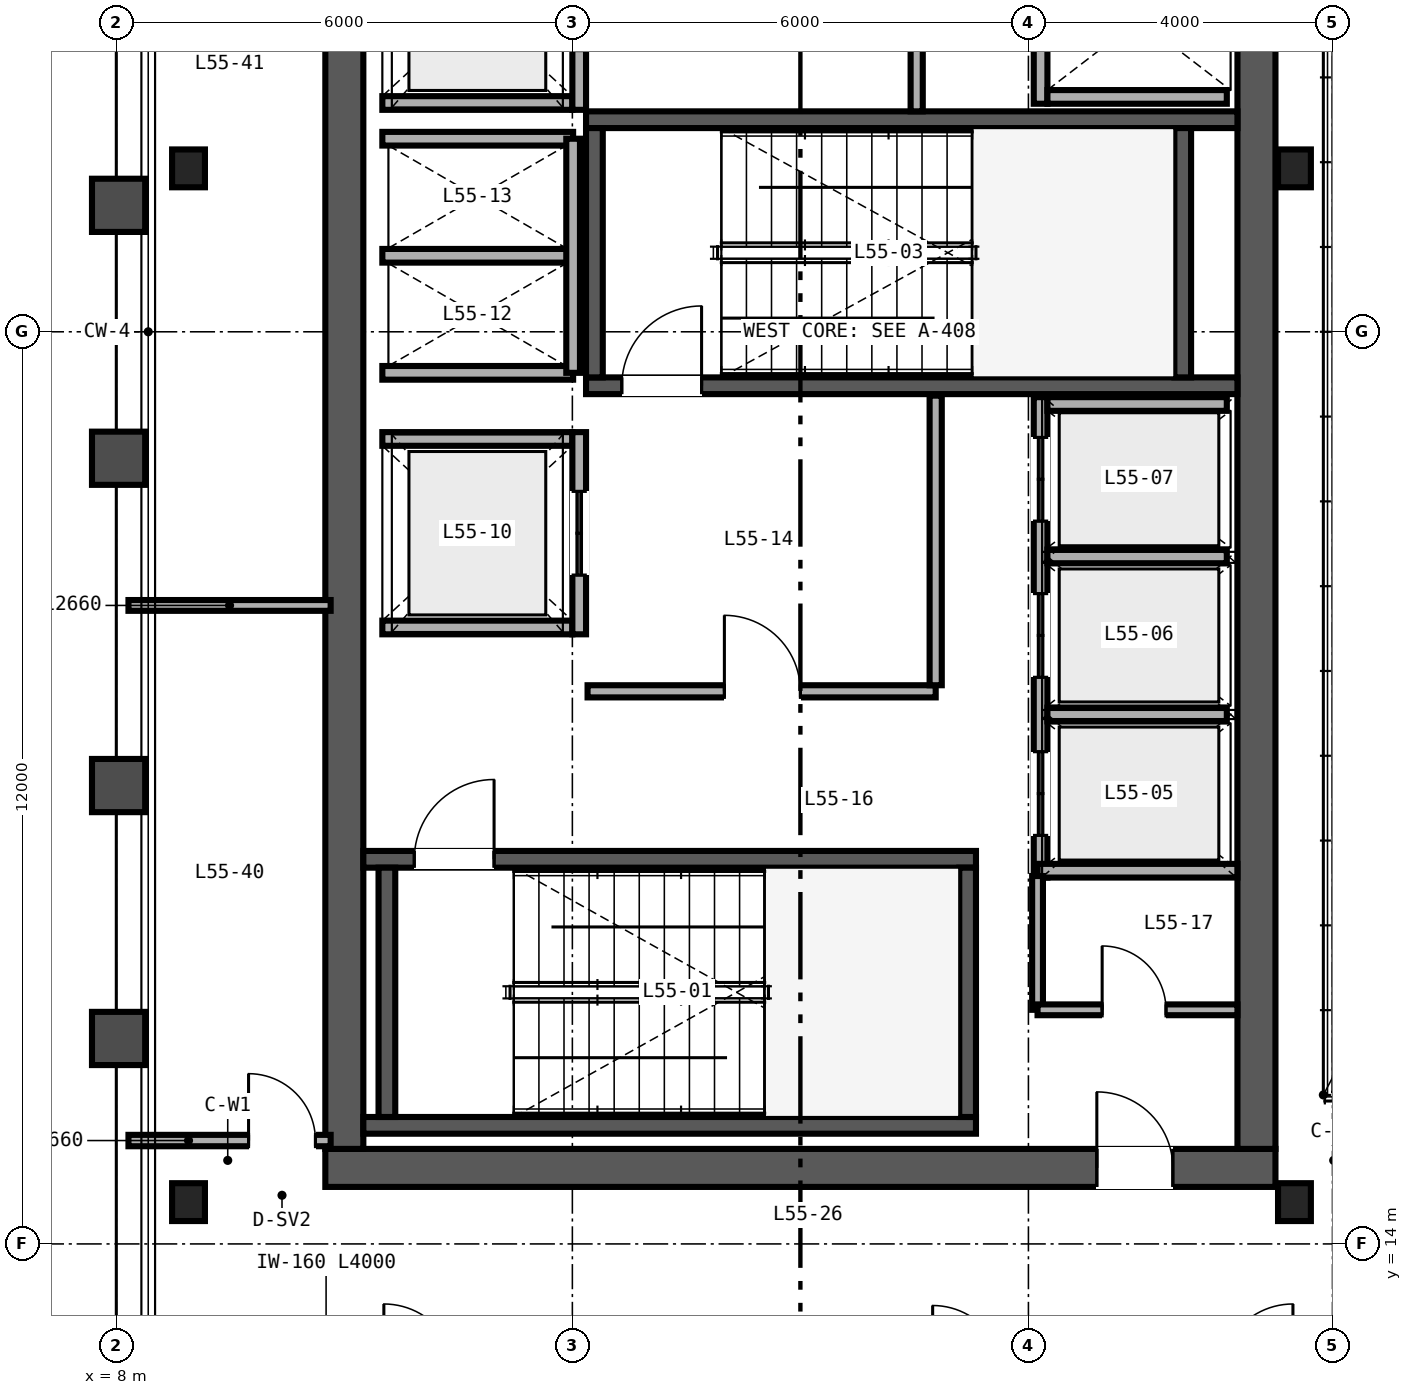
"""IFC4 building model, lengths in metres.
Left out: names, types, materials, properties, quantities, classifications, styles, units other than length and angle.
Written with IfcOpenShell. Run it as: python <this file> out.ifc"""

import sys

from ifc_helpers import new_model, si_unit, direction, frame, frame_2d, origin, origin_2d, place, context, subcontext, project, spatial, rectangle, i_section, extrude, source, transform, mapped, element, fill, save


model = new_model("IFC4")
c1 = context("Model", 3, precision=1e-05, world=origin(), true_north=direction((0.0, 1.0)))
c2 = subcontext(c1, "Body", "Model", "MODEL_VIEW")
j1 = project(units=[si_unit("LENGTHUNIT", "METRE"), si_unit("PLANEANGLEUNIT", "RADIAN")], contexts=[c1])
p1 = place(None, origin())
s1 = spatial("IfcSite", under=j1, at=p1, CompositionType="ELEMENT")
p2 = place(p1, origin())
s2 = spatial("IfcBuilding", under=s1, at=p2, CompositionType="ELEMENT")
p3 = place(p2, frame((0.0, 0.0, 217.2)))
s3 = spatial("IfcBuildingStorey", under=s2, at=p3, CompositionType="ELEMENT", Elevation=217.2)
p4 = place(p3, frame((10.75, 15.0, 0.0), z_axis=(0.0, 0.0, 1.0), x_axis=(1.0, 0.0, 0.0)))
e1 = element("IfcWall", 1, at=p4, inside=s3, PredefinedType="SHEAR", context=c2, shape_type="SweptSolid", body=[
    extrude(rectangle(XDim=12.5, YDim=0.5, at=frame_2d((6.25, 0.0))), origin(), (0.0, 0.0, 1.0), 3.28),
])
p5 = place(p4, frame((10.15, 0.0, 0.0)))
e2 = element("IfcOpeningElement", 2, at=p5, cuts=e1, PredefinedType="OPENING", context=c2, shape_type="SweptSolid", body=[
    extrude(rectangle(XDim=1.0, YDim=2.15, at=frame_2d((0.5, 1.075))), frame((0.0, 0.26, 0.0), z_axis=(0.0, -1.0, 0.0), x_axis=(1.0, 0.0, 0.0)), (0.0, 0.0, 1.0), 0.52),
])
for number, where, z_axis, x_axis in (
    (3, (11.0, 15.25, 0.0), (0.0, 0.0, 1.0), (0.0, 1.0, 0.0)),
    (4, (23.0, 15.25, 0.0), (0.0, 0.0, 1.0), (0.0, 1.0, 0.0)),
):
    element("IfcWall", number, at=place(p3, frame(where, z_axis=z_axis, x_axis=x_axis)), inside=s3, PredefinedType="SHEAR", context=c2, shape_type="SweptSolid", body=[
        extrude(rectangle(XDim=21.5, YDim=0.5, at=frame_2d((10.75, 0.0))), origin(), (0.0, 0.0, 1.0), 3.28),
    ])
p6 = place(p3, frame((11.25, 15.56, 0.0), z_axis=(0.0, 0.0, 1.0), x_axis=(1.0, 0.0, 0.0)))
e5 = element("IfcWall", 5, at=p6, inside=s3, PredefinedType="SHEAR", context=c2, shape_type="SweptSolid", body=[
    extrude(rectangle(XDim=8.06, YDim=0.22, at=frame_2d((4.03, 0.0))), origin(), (0.0, 0.0, 1.0), 3.4),
])
p7 = place(p3, frame((11.25, 19.06, 0.0), z_axis=(0.0, 0.0, 1.0), x_axis=(1.0, 0.0, 0.0)))
e6 = element("IfcWall", 6, at=p7, inside=s3, PredefinedType="SHEAR", context=c2, shape_type="SweptSolid", body=[
    extrude(rectangle(XDim=8.06, YDim=0.22, at=frame_2d((4.03, 0.0))), origin(), (0.0, 0.0, 1.0), 3.4),
])
p8 = place(p7, frame((0.67, 0.0, 0.0)))
e7 = element("IfcOpeningElement", 7, at=p8, cuts=e6, PredefinedType="OPENING", context=c2, shape_type="SweptSolid", body=[
    extrude(rectangle(XDim=1.05, YDim=2.15, at=frame_2d((0.525, 1.075))), frame((0.0, 0.12, 0.0), z_axis=(0.0, -1.0, 0.0), x_axis=(1.0, 0.0, 0.0)), (0.0, 0.0, 1.0), 0.24),
])
for number, where, z_axis, x_axis in (
    (8, (11.56, 15.67, 0.0), (0.0, 0.0, 1.0), (0.0, 1.0, 0.0)),
    (9, (19.2, 15.67, 0.0), (0.0, 0.0, 1.0), (0.0, 1.0, 0.0)),
):
    element("IfcWall", number, at=place(p3, frame(where, z_axis=z_axis, x_axis=x_axis)), inside=s3, PredefinedType="SHEAR", context=c2, shape_type="SweptSolid", body=[
        extrude(rectangle(XDim=3.28, YDim=0.22, at=frame_2d((1.64, 0.0))), origin(), (0.0, 0.0, 1.0), 3.4),
    ])
p9 = place(p3, frame((14.18, 25.29, 0.0), z_axis=(0.0, 0.0, 1.0), x_axis=(1.0, 0.0, 0.0)))
e10 = element("IfcWall", 10, at=p9, inside=s3, PredefinedType="SHEAR", context=c2, shape_type="SweptSolid", body=[
    extrude(rectangle(XDim=8.57, YDim=0.22, at=frame_2d((4.285, 0.0))), origin(), (0.0, 0.0, 1.0), 3.4),
])
p10 = place(p9, frame((0.47, 0.0, 0.0)))
e11 = element("IfcOpeningElement", 11, at=p10, cuts=e10, PredefinedType="OPENING", context=c2, shape_type="SweptSolid", body=[
    extrude(rectangle(XDim=1.05, YDim=2.15, at=frame_2d((0.525, 1.075))), frame((0.0, 0.12, 0.0), z_axis=(0.0, -1.0, 0.0), x_axis=(1.0, 0.0, 0.0)), (0.0, 0.0, 1.0), 0.24),
])
p11 = place(p3, frame((14.18, 28.79, 0.0), z_axis=(0.0, 0.0, 1.0), x_axis=(1.0, 0.0, 0.0)))
e12 = element("IfcWall", 12, at=p11, inside=s3, PredefinedType="SHEAR", context=c2, shape_type="SweptSolid", body=[
    extrude(rectangle(XDim=8.57, YDim=0.22, at=frame_2d((4.285, 0.0))), origin(), (0.0, 0.0, 1.0), 3.4),
])
for number, where, z_axis, x_axis in (
    (13, (14.29, 25.4, 0.0), (0.0, 0.0, 1.0), (0.0, 1.0, 0.0)),
    (14, (22.03, 25.4, 0.0), (0.0, 0.0, 1.0), (0.0, 1.0, 0.0)),
):
    element("IfcWall", number, at=place(p3, frame(where, z_axis=z_axis, x_axis=x_axis)), inside=s3, PredefinedType="SHEAR", context=c2, shape_type="SweptSolid", body=[
        extrude(rectangle(XDim=3.28, YDim=0.22, at=frame_2d((1.64, 0.0))), origin(), (0.0, 0.0, 1.0), 3.4),
    ])
m1 = source(origin(), c2, "Body", "SweptSolid", [
    extrude(i_section(OverallWidth=0.432, OverallDepth=0.498, WebThickness=0.056, FlangeThickness=0.089, FilletRadius=0.025, at=origin_2d()), origin(), (0.0, 0.0, 1.0), 3.28),
])
for number, where, z_axis, x_axis in (
    (15, (8.95, 14.55, 0.0), (0.0, 0.0, 1.0), (1.0, 0.0, 0.0)),
    (16, (23.5, 14.55, 0.0), (0.0, 0.0, 1.0), (1.0, 0.0, 0.0)),
    (17, (8.95, 28.15, 0.0), (0.0, 0.0, 1.0), (1.0, 0.0, 0.0)),
    (18, (23.5, 28.15, 0.0), (0.0, 0.0, 1.0), (1.0, 0.0, 0.0)),
):
    element("IfcColumn", number, at=place(p3, frame(where, z_axis=z_axis, x_axis=x_axis)), inside=s3, PredefinedType="COLUMN", context=c2, shape_type="MappedRepresentation", body=[
        mapped(m1, transform((0.0, 0.0, 0.0), scale=1.0)),
    ])
p12 = place(p3, frame((20.16, 18.82, 0.0), z_axis=(0.0, 0.0, 1.0), x_axis=(0.0, 1.0, 0.0)))
e19 = element("IfcWall", 19, at=p12, inside=s3, PredefinedType="SOLIDWALL", context=c2, shape_type="SweptSolid", body=[
    extrude(rectangle(XDim=6.32, YDim=0.18, at=frame_2d((3.16, 0.0))), origin(), (0.0, 0.0, 1.0), 2.38),
])
p13 = place(p12, frame((0.555, 0.0, 0.0)))
e20 = element("IfcOpeningElement", 20, at=p13, cuts=e19, PredefinedType="OPENING", context=c2, shape_type="SweptSolid", body=[
    extrude(rectangle(XDim=1.1, YDim=2.2, at=frame_2d((0.55, 1.1))), frame((0.0, 0.1, 0.0), z_axis=(0.0, -1.0, 0.0), x_axis=(1.0, 0.0, 0.0)), (0.0, 0.0, 1.0), 0.2),
])
p14 = place(p12, frame((2.635, 0.0, 0.0)))
e21 = element("IfcOpeningElement", 21, at=p14, cuts=e19, PredefinedType="OPENING", context=c2, shape_type="SweptSolid", body=[
    extrude(rectangle(XDim=1.1, YDim=2.2, at=frame_2d((0.55, 1.1))), frame((0.0, 0.1, 0.0), z_axis=(0.0, -1.0, 0.0), x_axis=(1.0, 0.0, 0.0)), (0.0, 0.0, 1.0), 0.2),
])
p15 = place(p12, frame((4.69, 0.0, 0.0)))
e22 = element("IfcOpeningElement", 22, at=p15, cuts=e19, PredefinedType="OPENING", context=c2, shape_type="SweptSolid", body=[
    extrude(rectangle(XDim=1.1, YDim=2.2, at=frame_2d((0.55, 1.1))), frame((0.0, 0.1, 0.0), z_axis=(0.0, -1.0, 0.0), x_axis=(1.0, 0.0, 0.0)), (0.0, 0.0, 1.0), 0.2),
])
p16 = place(p3, frame((20.12, 18.91, 0.0), z_axis=(0.0, 0.0, 1.0), x_axis=(1.0, 0.0, 0.0)))
e23 = element("IfcWall", 23, at=p16, inside=s3, PredefinedType="SOLIDWALL", context=c2, shape_type="SweptSolid", body=[
    extrude(rectangle(XDim=2.63, YDim=0.18, at=frame_2d((1.315, 0.0))), origin(), (0.0, 0.0, 1.0), 3.28),
])
p17 = place(p3, frame((20.25, 25.05, 0.0), z_axis=(0.0, 0.0, 1.0), x_axis=(1.0, 0.0, 0.0)))
e24 = element("IfcWall", 24, at=p17, inside=s3, PredefinedType="SOLIDWALL", context=c2, shape_type="SweptSolid", body=[
    extrude(rectangle(XDim=2.36, YDim=0.18, at=frame_2d((1.18, 0.0))), origin(), (0.0, 0.0, 1.0), 3.28),
])
p18 = place(p3, frame((20.25, 20.965, 0.0), z_axis=(0.0, 0.0, 1.0), x_axis=(1.0, 0.0, 0.0)))
e25 = element("IfcWall", 25, at=p18, inside=s3, PredefinedType="SOLIDWALL", context=c2, shape_type="SweptSolid", body=[
    extrude(rectangle(XDim=2.36, YDim=0.18, at=frame_2d((1.18, 0.0))), origin(), (0.0, 0.0, 1.0), 2.38),
])
p19 = place(p3, frame((20.25, 23.045, 0.0), z_axis=(0.0, 0.0, 1.0), x_axis=(1.0, 0.0, 0.0)))
e26 = element("IfcWall", 26, at=p19, inside=s3, PredefinedType="SOLIDWALL", context=c2, shape_type="SweptSolid", body=[
    extrude(rectangle(XDim=2.36, YDim=0.18, at=frame_2d((1.18, 0.0))), origin(), (0.0, 0.0, 1.0), 3.28),
])
p20 = place(p3, frame((20.16, 29.0, 0.0), z_axis=(0.0, 0.0, 1.0), x_axis=(0.0, 1.0, 0.0)))
e27 = element("IfcWall", 27, at=p20, inside=s3, PredefinedType="SOLIDWALL", context=c2, shape_type="SweptSolid", body=[
    extrude(rectangle(XDim=4.29, YDim=0.18, at=frame_2d((2.145, 0.0))), origin(), (0.0, 0.0, 1.0), 3.28),
])
p21 = place(p3, frame((20.25, 29.09, 0.0), z_axis=(0.0, 0.0, 1.0), x_axis=(1.0, 0.0, 0.0)))
e28 = element("IfcWall", 28, at=p21, inside=s3, PredefinedType="SOLIDWALL", context=c2, shape_type="SweptSolid", body=[
    extrude(rectangle(XDim=2.36, YDim=0.18, at=frame_2d((1.18, 0.0))), origin(), (0.0, 0.0, 1.0), 3.28),
])
for number, where, z_axis, x_axis in (
    (29, (11.5, 22.11, 0.0), (0.0, 0.0, 1.0), (1.0, 0.0, 0.0)),
    (30, (11.5, 24.59, 0.0), (0.0, 0.0, 1.0), (1.0, 0.0, 0.0)),
):
    element("IfcWall", number, at=place(p3, frame(where, z_axis=z_axis, x_axis=x_axis)), inside=s3, PredefinedType="SOLIDWALL", context=c2, shape_type="SweptSolid", body=[
        extrude(rectangle(XDim=2.5, YDim=0.18, at=frame_2d((1.25, 0.0))), origin(), (0.0, 0.0, 1.0), 3.28),
    ])
p22 = place(p3, frame((14.09, 22.02, 0.0), z_axis=(0.0, 0.0, 1.0), x_axis=(0.0, 1.0, 0.0)))
e31 = element("IfcWall", 31, at=p22, inside=s3, PredefinedType="SOLIDWALL", context=c2, shape_type="SweptSolid", body=[
    extrude(rectangle(XDim=2.66, YDim=0.18, at=frame_2d((1.33, 0.0))), origin(), (0.0, 0.0, 1.0), 3.28),
])
p23 = place(p22, frame((0.78, 0.0, 0.0)))
e32 = element("IfcOpeningElement", 32, at=p23, cuts=e31, PredefinedType="OPENING", context=c2, shape_type="SweptSolid", body=[
    extrude(rectangle(XDim=1.1, YDim=2.2, at=frame_2d((0.55, 1.1))), frame((0.0, 0.1, 0.0), z_axis=(0.0, -1.0, 0.0), x_axis=(1.0, 0.0, 0.0)), (0.0, 0.0, 1.0), 0.2),
])
p24 = place(p3, frame((11.5, 29.01, 0.0), z_axis=(0.0, 0.0, 1.0), x_axis=(1.0, 0.0, 0.0)))
e33 = element("IfcWall", 33, at=p24, inside=s3, PredefinedType="SOLIDWALL", context=c2, shape_type="SweptSolid", body=[
    extrude(rectangle(XDim=2.5, YDim=0.18, at=frame_2d((1.25, 0.0))), origin(), (0.0, 0.0, 1.0), 3.28),
])
p25 = place(p3, frame((14.09, 28.92, 0.0), z_axis=(0.0, 0.0, 1.0), x_axis=(0.0, 1.0, 0.0)))
e34 = element("IfcWall", 34, at=p25, inside=s3, PredefinedType="SOLIDWALL", context=c2, shape_type="SweptSolid", body=[
    extrude(rectangle(XDim=2.66, YDim=0.18, at=frame_2d((1.33, 0.0))), origin(), (0.0, 0.0, 1.0), 3.28),
])
p26 = place(p25, frame((0.78, 0.0, 0.0)))
e35 = element("IfcOpeningElement", 35, at=p26, cuts=e34, PredefinedType="OPENING", context=c2, shape_type="SweptSolid", body=[
    extrude(rectangle(XDim=1.1, YDim=2.2, at=frame_2d((0.55, 1.1))), frame((0.0, 0.1, 0.0), z_axis=(0.0, -1.0, 0.0), x_axis=(1.0, 0.0, 0.0)), (0.0, 0.0, 1.0), 0.2),
])
for number, where, z_axis, x_axis in (
    (36, (11.5, 25.46, 0.0), (0.0, 0.0, 1.0), (1.0, 0.0, 0.0)),
    (37, (11.5, 27.0, 0.0), (0.0, 0.0, 1.0), (1.0, 0.0, 0.0)),
    (38, (11.5, 28.54, 0.0), (0.0, 0.0, 1.0), (1.0, 0.0, 0.0)),
):
    element("IfcWall", number, at=place(p3, frame(where, z_axis=z_axis, x_axis=x_axis)), inside=s3, PredefinedType="SOLIDWALL", context=c2, shape_type="SweptSolid", body=[
        extrude(rectangle(XDim=2.51, YDim=0.18, at=frame_2d((1.255, 0.0))), origin(), (0.0, 0.0, 1.0), 3.28),
    ])
p27 = place(p3, frame((14.01, 25.46, 0.0), z_axis=(0.0, 0.0, 1.0), x_axis=(0.0, 1.0, 0.0)))
e39 = element("IfcWall", 39, at=p27, inside=s3, PredefinedType="SOLIDWALL", context=c2, shape_type="SweptSolid", body=[
    extrude(rectangle(XDim=3.08, YDim=0.18, at=frame_2d((1.54, 0.0))), origin(), (0.0, 0.0, 1.0), 3.28),
])
p28 = place(p3, frame((14.2, 21.27, 0.0), z_axis=(0.0, 0.0, 1.0), x_axis=(1.0, 0.0, 0.0)))
e40 = element("IfcWall", 40, at=p28, inside=s3, PredefinedType="PARTITIONING", context=c2, shape_type="SweptSolid", body=[
    extrude(rectangle(XDim=4.58, YDim=0.16, at=frame_2d((2.29, 0.0))), origin(), (0.0, 0.0, 1.0), 3.28),
])
p29 = place(p28, frame((1.8, 0.0, 0.0)))
e41 = element("IfcOpeningElement", 41, at=p29, cuts=e40, PredefinedType="OPENING", context=c2, shape_type="SweptSolid", body=[
    extrude(rectangle(XDim=1.0, YDim=2.15, at=frame_2d((0.5, 1.075))), frame((0.0, 0.09, 0.0), z_axis=(0.0, -1.0, 0.0), x_axis=(1.0, 0.0, 0.0)), (0.0, 0.0, 1.0), 0.18),
])
p30 = place(p3, frame((18.78, 21.35, 0.0), z_axis=(0.0, 0.0, 1.0), x_axis=(0.0, 1.0, 0.0)))
e42 = element("IfcWall", 42, at=p30, inside=s3, PredefinedType="PARTITIONING", context=c2, shape_type="SweptSolid", body=[
    extrude(rectangle(XDim=3.81, YDim=0.16, at=frame_2d((1.905, 0.0))), origin(), (0.0, 0.0, 1.0), 3.28),
])
p31 = place(p3, frame((18.53, 28.9, 0.0), z_axis=(0.0, 0.0, 1.0), x_axis=(0.0, 1.0, 0.0)))
e43 = element("IfcWall", 43, at=p31, inside=s3, PredefinedType="PARTITIONING", context=c2, shape_type="SweptSolid", body=[
    extrude(rectangle(XDim=3.9, YDim=0.16, at=frame_2d((1.95, 0.0))), origin(), (0.0, 0.0, 1.0), 3.28),
])
p32 = place(p31, frame((1.5, 0.0, 0.0)))
e44 = element("IfcOpeningElement", 44, at=p32, cuts=e43, PredefinedType="OPENING", context=c2, shape_type="SweptSolid", body=[
    extrude(rectangle(XDim=1.0, YDim=2.15, at=frame_2d((0.5, 1.075))), frame((0.0, 0.09, 0.0), z_axis=(0.0, -1.0, 0.0), x_axis=(1.0, 0.0, 0.0)), (0.0, 0.0, 1.0), 0.18),
])
p33 = place(p3, frame((20.12, 17.08, 0.0), z_axis=(0.0, 0.0, 1.0), x_axis=(0.0, 1.0, 0.0)))
e45 = element("IfcWall", 45, at=p33, inside=s3, PredefinedType="PARTITIONING", context=c2, shape_type="SweptSolid", body=[
    extrude(rectangle(XDim=1.76, YDim=0.142, at=frame_2d((0.88, 0.0))), origin(), (0.0, 0.0, 1.0), 3.28),
])
p34 = place(p3, frame((20.12, 17.08, 0.0), z_axis=(0.0, 0.0, 1.0), x_axis=(1.0, 0.0, 0.0)))
e46 = element("IfcWall", 46, at=p34, inside=s3, PredefinedType="PARTITIONING", context=c2, shape_type="SweptSolid", body=[
    extrude(rectangle(XDim=2.63, YDim=0.142, at=frame_2d((1.315, 0.0))), origin(), (0.0, 0.0, 1.0), 3.28),
])
p35 = place(p34, frame((0.85, 0.0, 0.0)))
e47 = element("IfcOpeningElement", 47, at=p35, cuts=e46, PredefinedType="OPENING", context=c2, shape_type="SweptSolid", body=[
    extrude(rectangle(XDim=0.84, YDim=2.1, at=frame_2d((0.42, 1.05))), frame((0.0, 0.081, 0.0), z_axis=(0.0, -1.0, 0.0), x_axis=(1.0, 0.0, 0.0)), (0.0, 0.0, 1.0), 0.162),
])
p36 = place(p3, frame((8.16, 15.36, 0.0), z_axis=(0.0, 0.0, 1.0), x_axis=(1.0, 0.0, 0.0)))
e48 = element("IfcWall", 48, at=p36, inside=s3, PredefinedType="PARTITIONING", context=c2, shape_type="SweptSolid", body=[
    extrude(rectangle(XDim=2.66, YDim=0.15, at=frame_2d((1.33, 0.0))), origin(), (0.0, 0.0, 1.0), 2.501),
])
p37 = place(p36, frame((1.58, 0.0, 0.0)))
e49 = element("IfcOpeningElement", 49, at=p37, cuts=e48, PredefinedType="OPENING", context=c2, shape_type="SweptSolid", body=[
    extrude(rectangle(XDim=0.88, YDim=2.15, at=frame_2d((0.44, 1.075))), frame((0.0, 0.085, 0.0), z_axis=(0.0, -1.0, 0.0), x_axis=(1.0, 0.0, 0.0)), (0.0, 0.0, 1.0), 0.17),
])
p38 = place(p3, frame((8.16, 22.4, 0.0), z_axis=(0.0, 0.0, 1.0), x_axis=(1.0, 0.0, 0.0)))
e50 = element("IfcWall", 50, at=p38, inside=s3, PredefinedType="PARTITIONING", context=c2, shape_type="SweptSolid", body=[
    extrude(rectangle(XDim=2.66, YDim=0.142, at=frame_2d((1.33, 0.0))), origin(), (0.0, 0.0, 1.0), 2.501),
])
m2 = source(origin(), c2, "Body", "SweptSolid", [
    extrude(rectangle(XDim=1.05, YDim=2.15, at=frame_2d((0.525, 1.075))), frame((0.0, 0.025, 0.0), z_axis=(0.0, -1.0, 0.0), x_axis=(1.0, 0.0, 0.0)), (0.0, 0.0, 1.0), 0.05),
])
p39 = place(p8, origin())
e51 = element("IfcDoor", 51, at=p39, inside=s3, OperationType="SINGLE_SWING_RIGHT", PredefinedType="DOOR", context=c2, shape_type="MappedRepresentation", body=[
    mapped(m2, transform((0.0, 0.0, 0.0), scale=1.0)),
])
fill(e7, e51)
p40 = place(p10, origin())
e52 = element("IfcDoor", 52, at=p40, inside=s3, OperationType="SINGLE_SWING_RIGHT", PredefinedType="DOOR", context=c2, shape_type="MappedRepresentation", body=[
    mapped(m2, transform((0.0, 0.0, 0.0), scale=1.0)),
])
fill(e11, e52)
m3 = source(origin(), c2, "Body", "SweptSolid", [
    extrude(rectangle(XDim=1.1, YDim=2.2, at=frame_2d((0.55, 1.1))), frame((0.0, 0.025, 0.0), z_axis=(0.0, -1.0, 0.0), x_axis=(1.0, 0.0, 0.0)), (0.0, 0.0, 1.0), 0.05),
])
p41 = place(p13, origin())
e53 = element("IfcDoor", 53, at=p41, inside=s3, OperationType="DOUBLE_DOOR_SLIDING", PredefinedType="DOOR", context=c2, shape_type="MappedRepresentation", body=[
    mapped(m3, transform((0.0, 0.0, 0.0), scale=1.0)),
])
fill(e20, e53)
p42 = place(p14, origin())
e54 = element("IfcDoor", 54, at=p42, inside=s3, OperationType="DOUBLE_DOOR_SLIDING", PredefinedType="DOOR", context=c2, shape_type="MappedRepresentation", body=[
    mapped(m3, transform((0.0, 0.0, 0.0), scale=1.0)),
])
fill(e21, e54)
p43 = place(p15, origin())
e55 = element("IfcDoor", 55, at=p43, inside=s3, OperationType="DOUBLE_DOOR_SLIDING", PredefinedType="DOOR", context=c2, shape_type="MappedRepresentation", body=[
    mapped(m3, transform((0.0, 0.0, 0.0), scale=1.0)),
])
fill(e22, e55)
p44 = place(p23, origin())
e56 = element("IfcDoor", 56, at=p44, inside=s3, OperationType="DOUBLE_DOOR_SLIDING", PredefinedType="DOOR", context=c2, shape_type="MappedRepresentation", body=[
    mapped(m3, transform((0.0, 0.0, 0.0), scale=1.0)),
])
fill(e32, e56)
m4 = source(origin(), c2, "Body", "SweptSolid", [
    extrude(rectangle(XDim=1.0, YDim=2.15, at=frame_2d((0.5, 1.075))), frame((0.0, 0.025, 0.0), z_axis=(0.0, -1.0, 0.0), x_axis=(1.0, 0.0, 0.0)), (0.0, 0.0, 1.0), 0.05),
])
p45 = place(p29, origin())
e57 = element("IfcDoor", 57, at=p45, inside=s3, OperationType="SINGLE_SWING_LEFT", PredefinedType="DOOR", context=c2, shape_type="MappedRepresentation", body=[
    mapped(m4, transform((0.0, 0.0, 0.0), scale=1.0)),
])
fill(e41, e57)
m5 = source(origin(), c2, "Body", "SweptSolid", [
    extrude(rectangle(XDim=0.84, YDim=2.1, at=frame_2d((0.42, 1.05))), frame((0.0, 0.025, 0.0), z_axis=(0.0, -1.0, 0.0), x_axis=(1.0, 0.0, 0.0)), (0.0, 0.0, 1.0), 0.05),
])
p46 = place(p35, origin())
e58 = element("IfcDoor", 58, at=p46, inside=s3, OperationType="SINGLE_SWING_LEFT", PredefinedType="DOOR", context=c2, shape_type="MappedRepresentation", body=[
    mapped(m5, transform((0.0, 0.0, 0.0), scale=1.0)),
])
fill(e47, e58)
p47 = place(p5, origin())
e59 = element("IfcDoor", 59, at=p47, inside=s3, OperationType="SINGLE_SWING_LEFT", PredefinedType="DOOR", context=c2, shape_type="MappedRepresentation", body=[
    mapped(m4, transform((0.0, 0.0, 0.0), scale=1.0)),
])
fill(e2, e59)
m6 = source(origin(), c2, "Body", "SweptSolid", [
    extrude(rectangle(XDim=0.88, YDim=2.15, at=frame_2d((0.44, 1.075))), frame((0.0, 0.025, 0.0), z_axis=(0.0, -1.0, 0.0), x_axis=(1.0, 0.0, 0.0)), (0.0, 0.0, 1.0), 0.05),
])
p48 = place(p37, origin())
e60 = element("IfcDoor", 60, at=p48, inside=s3, OperationType="SINGLE_SWING_LEFT", PredefinedType="DOOR", context=c2, shape_type="MappedRepresentation", body=[
    mapped(m6, transform((0.0, 0.0, 0.0), scale=1.0)),
])
fill(e49, e60)
save(model, sys.argv[1])
